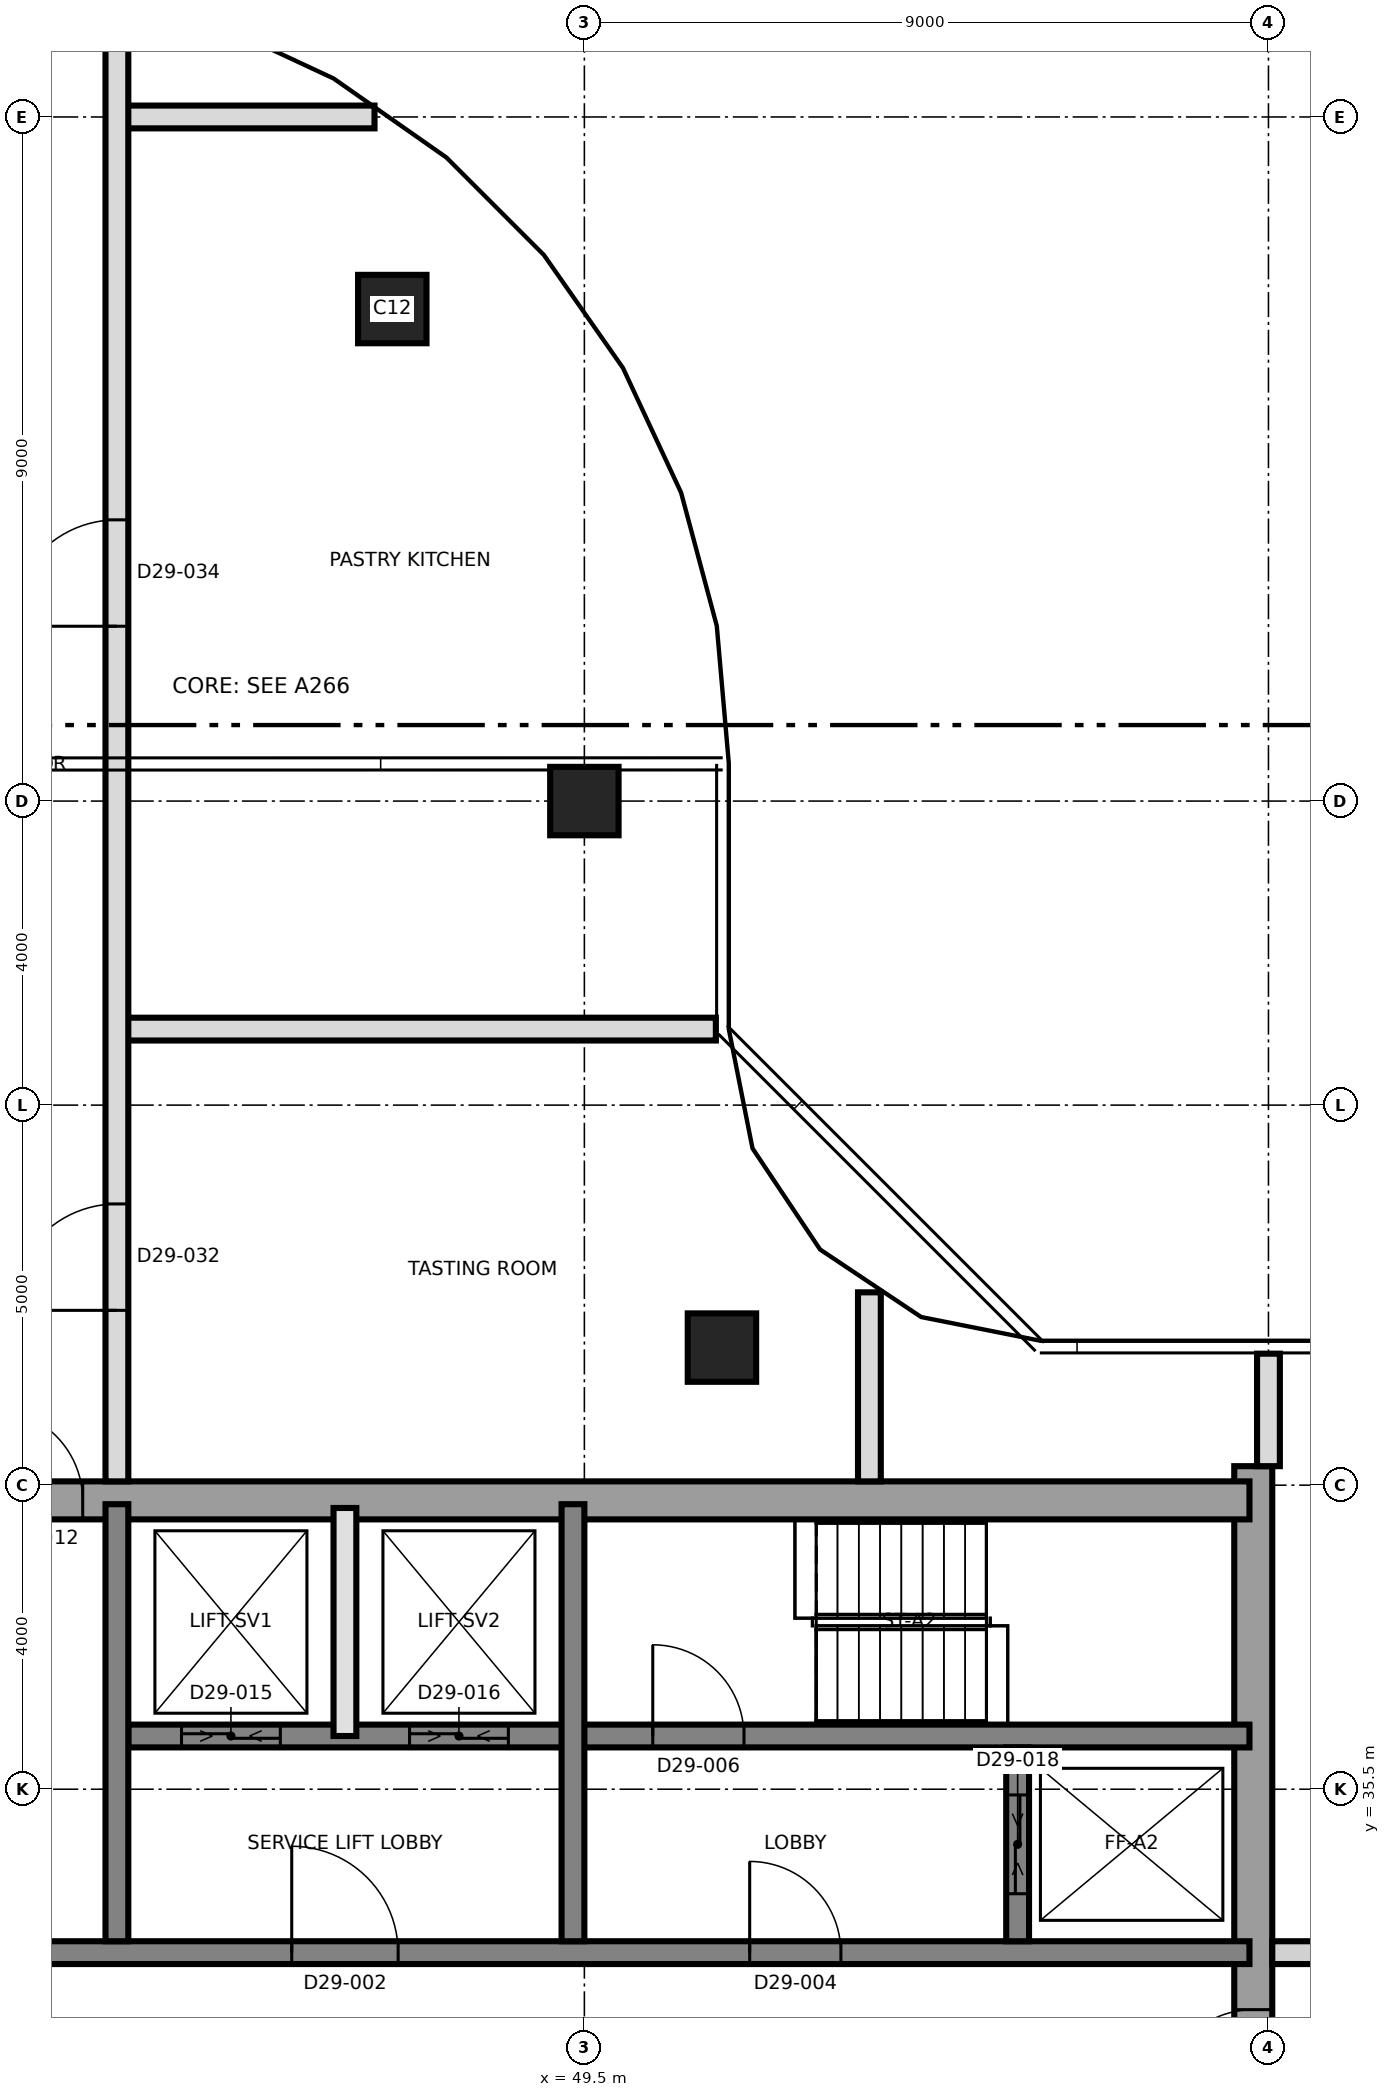
"""IFC4 building model, lengths in metres.
Left out: names, types, materials, properties, quantities, classifications, styles, units other than length and angle.
Written with IfcOpenShell. Run it as: python <this file> out.ifc"""

import sys

from ifc_helpers import new_model, si_unit, direction, frame, frame_2d, origin, origin_2d, place, context, subcontext, project, spatial, rectangle, extrude, element, fill, save


model = new_model("IFC4")
c1 = context("Model", 3, precision=1e-05, world=origin(), true_north=direction((0.0, 1.0)))
c2 = subcontext(c1, "Body", "Model", "MODEL_VIEW")
j1 = project(units=[si_unit("LENGTHUNIT", "METRE"), si_unit("PLANEANGLEUNIT", "RADIAN")], contexts=[c1])
p1 = place(None, origin())
s1 = spatial("IfcSite", under=j1, at=p1, CompositionType="ELEMENT")
p2 = place(p1, origin())
s2 = spatial("IfcBuilding", under=s1, at=p2, CompositionType="ELEMENT")
p3 = place(p2, frame((0.0, 0.0, 254.9)))
s3 = spatial("IfcBuildingStorey", under=s2, at=p3, CompositionType="ELEMENT", Elevation=254.9)
p4 = place(p3, frame((58.3, 21.25, 0.0), z_axis=(0.0, 0.0, 1.0), x_axis=(0.0, 1.0, 0.0)))
e1 = element("IfcWall", 1, at=p4, inside=s3, PredefinedType="SHEAR", context=c2, shape_type="SweptSolid", body=[
    extrude(rectangle(XDim=18.5, YDim=0.5, at=frame_2d((9.25, 0.0))), origin(), (0.0, 0.0, 1.0), 6.0),
])
p5 = place(p4, frame((10.15, 0.0, 0.0)))
e2 = element("IfcOpeningElement", 2, at=p5, cuts=e1, PredefinedType="OPENING", context=c2, shape_type="SweptSolid", body=[
    extrude(rectangle(XDim=1.2, YDim=2.1, at=frame_2d((0.6, 1.05))), frame((0.0, 0.26, 0.0), z_axis=(0.0, -1.0, 0.0), x_axis=(1.0, 0.0, 0.0)), (0.0, 0.0, 1.0), 0.52),
])
p6 = place(p3, frame((31.25, 39.3, 0.0), z_axis=(0.0, 0.0, 1.0), x_axis=(1.0, 0.0, 0.0)))
e3 = element("IfcWall", 3, at=p6, inside=s3, PredefinedType="SHEAR", context=c2, shape_type="SweptSolid", body=[
    extrude(rectangle(XDim=27.0, YDim=0.5, at=frame_2d((13.5, 0.0))), origin(), (0.0, 0.0, 1.0), 6.0),
])
p7 = place(p6, frame((10.45, 0.0, 0.0)))
e4 = element("IfcOpeningElement", 4, at=p7, cuts=e3, PredefinedType="OPENING", context=c2, shape_type="SweptSolid", body=[
    extrude(rectangle(XDim=1.2, YDim=2.1, at=frame_2d((0.6, 1.05))), frame((0.0, 0.26, 0.0), z_axis=(0.0, -1.0, 0.0), x_axis=(1.0, 0.0, 0.0)), (0.0, 0.0, 1.0), 0.52),
])
p8 = place(p3, frame((31.75, 33.35, 0.0), z_axis=(0.0, 0.0, 1.0), x_axis=(1.0, 0.0, 0.0)))
e5 = element("IfcWall", 5, at=p8, inside=s3, PredefinedType="SHEAR", context=c2, shape_type="SweptSolid", body=[
    extrude(rectangle(XDim=26.5, YDim=0.3, at=frame_2d((13.25, 0.0))), origin(), (0.0, 0.0, 1.0), 6.0),
])
p9 = place(p8, frame((13.9, 0.0, 0.0)))
e6 = element("IfcOpeningElement", 6, at=p9, cuts=e5, PredefinedType="OPENING", context=c2, shape_type="SweptSolid", body=[
    extrude(rectangle(XDim=1.4, YDim=2.1, at=frame_2d((0.7, 1.05))), frame((0.0, 0.16, 0.0), z_axis=(0.0, -1.0, 0.0), x_axis=(1.0, 0.0, 0.0)), (0.0, 0.0, 1.0), 0.32),
])
p10 = place(p8, frame((5.375, 0.0, 0.0)))
e7 = element("IfcOpeningElement", 7, at=p10, cuts=e5, PredefinedType="OPENING", context=c2, shape_type="SweptSolid", body=[
    extrude(rectangle(XDim=1.2, YDim=2.1, at=frame_2d((0.6, 1.05))), frame((0.0, 0.16, 0.0), z_axis=(0.0, -1.0, 0.0), x_axis=(1.0, 0.0, 0.0)), (0.0, 0.0, 1.0), 0.32),
])
p11 = place(p8, frame((19.925, 0.0, 0.0)))
e8 = element("IfcOpeningElement", 8, at=p11, cuts=e5, PredefinedType="OPENING", context=c2, shape_type="SweptSolid", body=[
    extrude(rectangle(XDim=1.2, YDim=2.1, at=frame_2d((0.6, 1.05))), frame((0.0, 0.16, 0.0), z_axis=(0.0, -1.0, 0.0), x_axis=(1.0, 0.0, 0.0)), (0.0, 0.0, 1.0), 0.32),
])
p12 = place(p3, frame((43.5, 36.2, 0.0), z_axis=(0.0, 0.0, 1.0), x_axis=(1.0, 0.0, 0.0)))
e9 = element("IfcWall", 9, at=p12, inside=s3, PredefinedType="SHEAR", context=c2, shape_type="SweptSolid", body=[
    extrude(rectangle(XDim=14.75, YDim=0.3, at=frame_2d((7.375, 0.0))), origin(), (0.0, 0.0, 1.0), 6.0),
])
p13 = place(p12, frame((6.9, 0.0, 0.0)))
e10 = element("IfcOpeningElement", 10, at=p13, cuts=e9, PredefinedType="OPENING", context=c2, shape_type="SweptSolid", body=[
    extrude(rectangle(XDim=1.2, YDim=2.1, at=frame_2d((0.6, 1.05))), frame((0.0, 0.16, 0.0), z_axis=(0.0, -1.0, 0.0), x_axis=(1.0, 0.0, 0.0)), (0.0, 0.0, 1.0), 0.32),
])
p14 = place(p12, frame((0.7, 0.0, 0.0)))
e11 = element("IfcOpeningElement", 11, at=p14, cuts=e9, PredefinedType="OPENING", context=c2, shape_type="SweptSolid", body=[
    extrude(rectangle(XDim=1.3, YDim=2.4, at=frame_2d((0.65, 1.2))), frame((0.0, 0.16, 0.0), z_axis=(0.0, -1.0, 0.0), x_axis=(1.0, 0.0, 0.0)), (0.0, 0.0, 1.0), 0.32),
])
p15 = place(p12, frame((3.7, 0.0, 0.0)))
e12 = element("IfcOpeningElement", 12, at=p15, cuts=e9, PredefinedType="OPENING", context=c2, shape_type="SweptSolid", body=[
    extrude(rectangle(XDim=1.3, YDim=2.4, at=frame_2d((0.65, 1.2))), frame((0.0, 0.16, 0.0), z_axis=(0.0, -1.0, 0.0), x_axis=(1.0, 0.0, 0.0)), (0.0, 0.0, 1.0), 0.32),
])
for number, where, z_axis, x_axis in (
    (13, (43.35, 33.5, 0.0), (0.0, 0.0, 1.0), (0.0, 1.0, 0.0)),
    (14, (49.35, 33.5, 0.0), (0.0, 0.0, 1.0), (0.0, 1.0, 0.0)),
):
    element("IfcWall", number, at=place(p3, frame(where, z_axis=z_axis, x_axis=x_axis)), inside=s3, PredefinedType="SHEAR", context=c2, shape_type="SweptSolid", body=[
        extrude(rectangle(XDim=5.75, YDim=0.3, at=frame_2d((2.875, 0.0))), origin(), (0.0, 0.0, 1.0), 6.0),
    ])
p16 = place(p3, frame((55.2, 33.5, 0.0), z_axis=(0.0, 0.0, 1.0), x_axis=(0.0, 1.0, 0.0)))
e15 = element("IfcWall", 15, at=p16, inside=s3, PredefinedType="SHEAR", context=c2, shape_type="SweptSolid", body=[
    extrude(rectangle(XDim=2.55, YDim=0.3, at=frame_2d((1.275, 0.0))), origin(), (0.0, 0.0, 1.0), 6.0),
])
p17 = place(p16, frame((0.625, 0.0, 0.0)))
e16 = element("IfcOpeningElement", 16, at=p17, cuts=e15, PredefinedType="OPENING", context=c2, shape_type="SweptSolid", body=[
    extrude(rectangle(XDim=1.3, YDim=2.4, at=frame_2d((0.65, 1.2))), frame((0.0, 0.16, 0.0), z_axis=(0.0, -1.0, 0.0), x_axis=(1.0, 0.0, 0.0)), (0.0, 0.0, 1.0), 0.32),
])
for number, where, z_axis, x_axis in (
    (17, (51.31, 41.31, 0.0), (0.0, 0.0, 1.0), (1.0, 0.0, 0.0)),
    (18, (49.5, 48.5, 0.0), (0.0, 0.0, 1.0), (1.0, 0.0, 0.0)),
    (19, (46.973, 54.973, 0.0), (0.0, 0.0, 1.0), (1.0, 0.0, 0.0)),
):
    element("IfcColumn", number, at=place(p3, frame(where, z_axis=z_axis, x_axis=x_axis)), inside=s3, PredefinedType="COLUMN", context=c2, shape_type="SweptSolid", body=[
        extrude(rectangle(XDim=0.9, YDim=0.9, at=origin_2d()), origin(), (0.0, 0.0, 1.0), 6.0),
    ])
p18 = place(p3, frame((46.35, 36.2, 0.0), z_axis=(0.0, 0.0, 1.0), x_axis=(0.0, 1.0, 0.0)))
e20 = element("IfcWall", 20, at=p18, inside=s3, PredefinedType="SOLIDWALL", context=c2, shape_type="SweptSolid", body=[
    extrude(rectangle(XDim=3.0, YDim=0.3, at=frame_2d((1.5, 0.0))), origin(), (0.0, 0.0, 1.0), 5.7),
])
p19 = place(p3, frame((58.55, 33.35, 0.0), z_axis=(0.0, 0.0, 1.0), x_axis=(1.0, 0.0, 0.0)))
e21 = element("IfcWall", 21, at=p19, inside=s3, PredefinedType="PARTITIONING", context=c2, shape_type="SweptSolid", body=[
    extrude(rectangle(XDim=26.78, YDim=0.3, at=frame_2d((13.39, 0.0))), origin(), (0.0, 0.0, 1.0), 5.7),
])
p20 = place(p19, frame((12.25, 0.0, 0.0)))
e22 = element("IfcOpeningElement", 22, at=p20, cuts=e21, PredefinedType="OPENING", context=c2, shape_type="SweptSolid", body=[
    extrude(rectangle(XDim=2.4, YDim=2.4, at=frame_2d((1.2, 1.2))), frame((0.0, 0.16, 0.0), z_axis=(0.0, -1.0, 0.0), x_axis=(1.0, 0.0, 0.0)), (0.0, 0.0, 1.0), 0.32),
])
p21 = place(p3, frame((43.35, 45.5, 0.0), z_axis=(0.0, 0.0, 1.0), x_axis=(1.0, 0.0, 0.0)))
e23 = element("IfcWall", 23, at=p21, inside=s3, PredefinedType="PARTITIONING", context=c2, shape_type="SweptSolid", body=[
    extrude(rectangle(XDim=7.88, YDim=0.3, at=frame_2d((3.94, 0.0))), origin(), (0.0, 0.0, 1.0), 5.65),
])
p22 = place(p3, frame((43.35, 57.5, 0.0), z_axis=(0.0, 0.0, 1.0), x_axis=(1.0, 0.0, 0.0)))
e24 = element("IfcWall", 24, at=p22, inside=s3, PredefinedType="PARTITIONING", context=c2, shape_type="SweptSolid", body=[
    extrude(rectangle(XDim=3.389, YDim=0.3, at=frame_2d((1.694, 0.0))), origin(), (0.0, 0.0, 1.0), 5.65),
])
p23 = place(p3, frame((43.35, 39.55, 0.0), z_axis=(0.0, 0.0, 1.0), x_axis=(0.0, 1.0, 0.0)))
e25 = element("IfcWall", 25, at=p23, inside=s3, PredefinedType="PARTITIONING", context=c2, shape_type="SweptSolid", body=[
    extrude(rectangle(XDim=19.0, YDim=0.3, at=frame_2d((9.5, 0.0))), origin(), (0.0, 0.0, 1.0), 5.65),
])
p24 = place(p23, frame((2.25, 0.0, 0.0)))
e26 = element("IfcOpeningElement", 26, at=p24, cuts=e25, PredefinedType="OPENING", context=c2, shape_type="SweptSolid", body=[
    extrude(rectangle(XDim=1.4, YDim=2.1, at=frame_2d((0.7, 1.05))), frame((0.0, 0.16, 0.0), z_axis=(0.0, -1.0, 0.0), x_axis=(1.0, 0.0, 0.0)), (0.0, 0.0, 1.0), 0.32),
])
p25 = place(p23, frame((11.25, 0.0, 0.0)))
e27 = element("IfcOpeningElement", 27, at=p25, cuts=e25, PredefinedType="OPENING", context=c2, shape_type="SweptSolid", body=[
    extrude(rectangle(XDim=1.4, YDim=2.1, at=frame_2d((0.7, 1.05))), frame((0.0, 0.16, 0.0), z_axis=(0.0, -1.0, 0.0), x_axis=(1.0, 0.0, 0.0)), (0.0, 0.0, 1.0), 0.32),
])
p26 = place(p3, frame((53.25, 39.55, 0.0), z_axis=(0.0, 0.0, 1.0), x_axis=(0.0, 1.0, 0.0)))
e28 = element("IfcWall", 28, at=p26, inside=s3, PredefinedType="PARTITIONING", context=c2, shape_type="SweptSolid", body=[
    extrude(rectangle(XDim=2.487, YDim=0.3, at=frame_2d((1.244, 0.0))), origin(), (0.0, 0.0, 1.0), 5.65),
])
p27 = place(p3, frame((58.5, 39.75, 0.0), z_axis=(0.0, 0.0, 1.0), x_axis=(0.0, 1.0, 0.0)))
e29 = element("IfcWall", 29, at=p27, inside=s3, PredefinedType="PARTITIONING", context=c2, shape_type="SweptSolid", body=[
    extrude(rectangle(XDim=1.48, YDim=0.3, at=frame_2d((0.74, 0.0))), origin(), (0.0, 0.0, 1.0), 5.65),
])
p28 = place(p9, origin())
e30 = element("IfcDoor", 30, at=p28, inside=s3, OperationType="SINGLE_SWING_RIGHT", PredefinedType="DOOR", context=c2, shape_type="SweptSolid", body=[
    extrude(rectangle(XDim=1.4, YDim=2.1, at=frame_2d((0.7, 1.05))), frame((0.0, 0.025, 0.0), z_axis=(0.0, -1.0, 0.0), x_axis=(1.0, 0.0, 0.0)), (0.0, 0.0, 1.0), 0.05),
])
fill(e6, e30)
p29 = place(p11, origin())
e31 = element("IfcDoor", 31, at=p29, inside=s3, OperationType="SINGLE_SWING_RIGHT", PredefinedType="DOOR", context=c2, shape_type="SweptSolid", body=[
    extrude(rectangle(XDim=1.2, YDim=2.1, at=frame_2d((0.6, 1.05))), frame((0.0, 0.025, 0.0), z_axis=(0.0, -1.0, 0.0), x_axis=(1.0, 0.0, 0.0)), (0.0, 0.0, 1.0), 0.05),
])
fill(e8, e31)
p30 = place(p13, origin())
e32 = element("IfcDoor", 32, at=p30, inside=s3, OperationType="SINGLE_SWING_LEFT", PredefinedType="DOOR", context=c2, shape_type="SweptSolid", body=[
    extrude(rectangle(XDim=1.2, YDim=2.1, at=frame_2d((0.6, 1.05))), frame((0.0, 0.025, 0.0), z_axis=(0.0, -1.0, 0.0), x_axis=(1.0, 0.0, 0.0)), (0.0, 0.0, 1.0), 0.05),
])
fill(e10, e32)
p31 = place(p5, origin())
e33 = element("IfcDoor", 33, at=p31, inside=s3, OperationType="SINGLE_SWING_LEFT", PredefinedType="DOOR", context=c2, shape_type="SweptSolid", body=[
    extrude(rectangle(XDim=1.2, YDim=2.1, at=frame_2d((0.6, 1.05))), frame((0.0, 0.025, 0.0), z_axis=(0.0, -1.0, 0.0), x_axis=(1.0, 0.0, 0.0)), (0.0, 0.0, 1.0), 0.05),
])
fill(e2, e33)
p32 = place(p7, origin())
e34 = element("IfcDoor", 34, at=p32, inside=s3, OperationType="SINGLE_SWING_RIGHT", PredefinedType="DOOR", context=c2, shape_type="SweptSolid", body=[
    extrude(rectangle(XDim=1.2, YDim=2.1, at=frame_2d((0.6, 1.05))), frame((0.0, 0.025, 0.0), z_axis=(0.0, -1.0, 0.0), x_axis=(1.0, 0.0, 0.0)), (0.0, 0.0, 1.0), 0.05),
])
fill(e4, e34)
p33 = place(p14, origin())
e35 = element("IfcDoor", 35, at=p33, inside=s3, OperationType="SLIDING_TO_LEFT", PredefinedType="DOOR", context=c2, shape_type="SweptSolid", body=[
    extrude(rectangle(XDim=1.3, YDim=2.4, at=frame_2d((0.65, 1.2))), frame((0.0, 0.025, 0.0), z_axis=(0.0, -1.0, 0.0), x_axis=(1.0, 0.0, 0.0)), (0.0, 0.0, 1.0), 0.05),
])
fill(e11, e35)
p34 = place(p15, origin())
e36 = element("IfcDoor", 36, at=p34, inside=s3, OperationType="SLIDING_TO_LEFT", PredefinedType="DOOR", context=c2, shape_type="SweptSolid", body=[
    extrude(rectangle(XDim=1.3, YDim=2.4, at=frame_2d((0.65, 1.2))), frame((0.0, 0.025, 0.0), z_axis=(0.0, -1.0, 0.0), x_axis=(1.0, 0.0, 0.0)), (0.0, 0.0, 1.0), 0.05),
])
fill(e12, e36)
p35 = place(p17, origin())
e37 = element("IfcDoor", 37, at=p35, inside=s3, OperationType="SLIDING_TO_LEFT", PredefinedType="DOOR", context=c2, shape_type="SweptSolid", body=[
    extrude(rectangle(XDim=1.3, YDim=2.4, at=frame_2d((0.65, 1.2))), frame((0.0, 0.025, 0.0), z_axis=(0.0, -1.0, 0.0), x_axis=(1.0, 0.0, 0.0)), (0.0, 0.0, 1.0), 0.05),
])
fill(e16, e37)
p36 = place(p24, origin())
e38 = element("IfcDoor", 38, at=p36, inside=s3, OperationType="SINGLE_SWING_LEFT", PredefinedType="DOOR", context=c2, shape_type="SweptSolid", body=[
    extrude(rectangle(XDim=1.4, YDim=2.1, at=frame_2d((0.7, 1.05))), frame((0.0, 0.025, 0.0), z_axis=(0.0, -1.0, 0.0), x_axis=(1.0, 0.0, 0.0)), (0.0, 0.0, 1.0), 0.05),
])
fill(e26, e38)
p37 = place(p25, origin())
e39 = element("IfcDoor", 39, at=p37, inside=s3, OperationType="SINGLE_SWING_LEFT", PredefinedType="DOOR", context=c2, shape_type="SweptSolid", body=[
    extrude(rectangle(XDim=1.4, YDim=2.1, at=frame_2d((0.7, 1.05))), frame((0.0, 0.025, 0.0), z_axis=(0.0, -1.0, 0.0), x_axis=(1.0, 0.0, 0.0)), (0.0, 0.0, 1.0), 0.05),
])
fill(e27, e39)
save(model, sys.argv[1])
